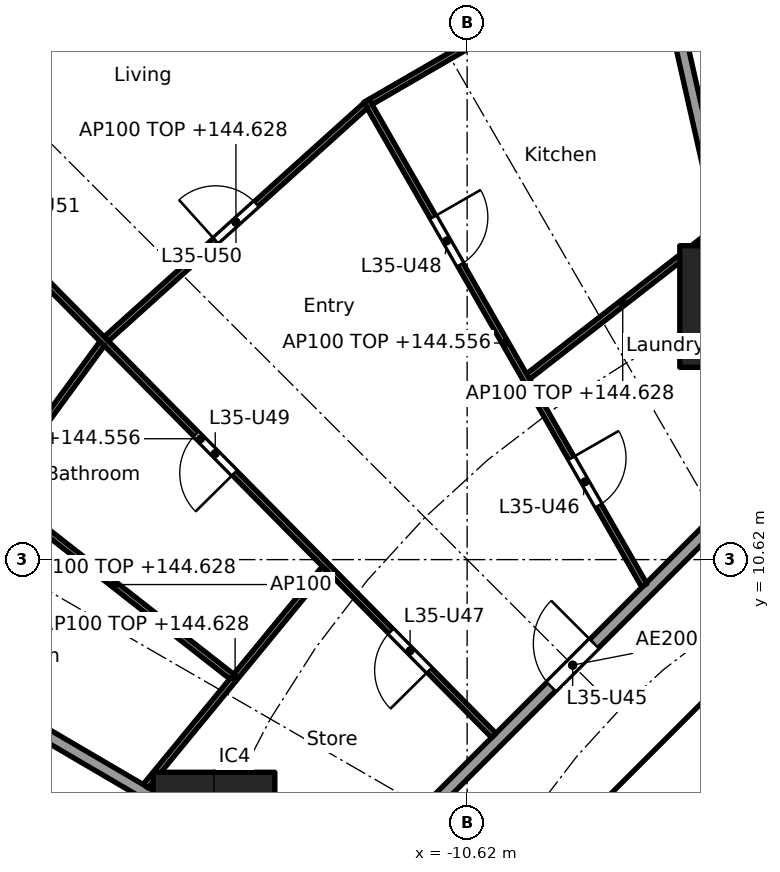
"""IFC4 building model, lengths in metres.
Left out: names, types, materials, properties, quantities, classifications, styles, units other than length and angle.
Written with IfcOpenShell. Run it as: python <this file> out.ifc"""

import sys

from ifc_helpers import new_model, si_unit, direction, frame, frame_2d, origin, origin_2d, place, context, subcontext, project, spatial, rectangle, extrude, element, fill, save


model = new_model("IFC4")
c1 = context("Model", 3, precision=1e-05, world=origin(), true_north=direction((0.0, 1.0)))
c2 = subcontext(c1, "Body", "Model", "MODEL_VIEW")
j1 = project(units=[si_unit("LENGTHUNIT", "METRE"), si_unit("PLANEANGLEUNIT", "RADIAN")], contexts=[c1])
p1 = place(None, origin())
s1 = spatial("IfcSite", under=j1, at=p1, CompositionType="ELEMENT")
p2 = place(p1, origin())
s2 = spatial("IfcBuilding", under=s1, at=p2, CompositionType="ELEMENT")
p3 = place(p2, frame((0.0, 0.0, 141.8)))
s3 = spatial("IfcBuildingStorey", under=s2, at=p3, CompositionType="ELEMENT", Elevation=141.8)
for number, where, z_axis, x_axis in (
    (1, (-6.123, 14.782, 0.0), (0.0, 0.0, 1.0), (1.0, 0.0, 0.0)),
    (2, (-14.782, 6.123, 0.0), (0.0, 0.0, 1.0), (1.0, 0.0, 0.0)),
):
    element("IfcColumn", number, at=place(p3, frame(where, z_axis=z_axis, x_axis=x_axis)), inside=s3, PredefinedType="COLUMN", context=c2, shape_type="SweptSolid", body=[
        extrude(rectangle(XDim=2.0, YDim=2.0, at=origin_2d()), origin(), (0.0, 0.0, 1.0), 3.7),
    ])
p4 = place(p3, frame((-4.613, 9.988, 0.0), z_axis=(0.0, 0.0, 1.0), x_axis=(-0.707106781187, -0.707106781187, 0.0)))
e3 = element("IfcWall", 3, at=p4, inside=s3, PredefinedType="SHEAR", context=c2, shape_type="SweptSolid", body=[
    extrude(rectangle(XDim=7.602, YDim=0.6, at=frame_2d((3.801, 0.0))), origin(), (0.0, 0.0, 1.0), 3.44),
])
p5 = place(p4, frame((0.351, 0.0, 0.0)))
e4 = element("IfcOpeningElement", 4, at=p5, cuts=e3, PredefinedType="OPENING", context=c2, shape_type="SweptSolid", body=[
    extrude(rectangle(XDim=1.1, YDim=2.1, at=frame_2d((0.55, 1.05))), frame((0.0, 0.31, 0.0), z_axis=(0.0, -1.0, 0.0), x_axis=(1.0, 0.0, 0.0)), (0.0, 0.0, 1.0), 0.62),
])
p6 = place(p3, frame((-6.134, 14.831, 0.0), z_axis=(0.0, 0.0, 1.0), x_axis=(-0.220337590808, 0.975423675167, 0.0)))
e5 = element("IfcWall", 5, at=p6, inside=s3, PredefinedType="PARTITIONING", context=c2, shape_type="SweptSolid", body=[
    extrude(rectangle(XDim=10.451, YDim=0.2, at=frame_2d((5.226, 0.0))), origin(), (0.0, 0.0, 1.0), 2.828),
])
p7 = place(p3, frame((-14.825, 6.148, 0.0), z_axis=(0.0, 0.0, 1.0), x_axis=(-0.862852031662, 0.505456597006, 0.0)))
e6 = element("IfcWall", 6, at=p7, inside=s3, PredefinedType="PARTITIONING", context=c2, shape_type="SweptSolid", body=[
    extrude(rectangle(XDim=10.487, YDim=0.2, at=frame_2d((5.244, 0.0))), origin(), (0.0, 0.0, 1.0), 2.828),
])
p8 = place(p3, frame((-5.275, 12.494, 0.0), z_axis=(0.0, 0.0, 1.0), x_axis=(-0.707106781187, -0.707106781187, 0.0)))
e7 = element("IfcWall", 7, at=p8, inside=s3, PredefinedType="PARTITIONING", context=c2, shape_type="SweptSolid", body=[
    extrude(rectangle(XDim=10.209, YDim=0.2, at=frame_2d((5.104, 0.0))), origin(), (0.0, 0.0, 1.0), 3.44),
])
p9 = place(p8, frame((4.604, 0.0, 0.0)))
e8 = element("IfcOpeningElement", 8, at=p9, cuts=e7, PredefinedType="OPENING", context=c2, shape_type="SweptSolid", body=[
    extrude(rectangle(XDim=1.0, YDim=2.1, at=frame_2d((0.5, 1.05))), frame((0.0, 0.11, 0.0), z_axis=(0.0, -1.0, 0.0), x_axis=(1.0, 0.0, 0.0)), (0.0, 0.0, 1.0), 0.22),
])
p10 = place(p3, frame((-6.503, 16.054, 0.0), z_axis=(0.0, 0.0, 1.0), x_axis=(-0.789428807693, -0.613842127574, 0.0)))
e9 = element("IfcWall", 9, at=p10, inside=s3, PredefinedType="PARTITIONING", context=c2, shape_type="SweptSolid", body=[
    extrude(rectangle(XDim=3.948, YDim=0.1, at=frame_2d((1.974, 0.0))), origin(), (0.0, 0.0, 1.0), 2.828),
])
p11 = place(p3, frame((-7.586, 20.827, 0.0), z_axis=(0.0, 0.0, 1.0), x_axis=(-0.865093450578, -0.501610727325, 0.0)))
e10 = element("IfcWall", 10, at=p11, inside=s3, PredefinedType="PARTITIONING", context=c2, shape_type="SweptSolid", body=[
    extrude(rectangle(XDim=5.343, YDim=0.1, at=frame_2d((2.671, 0.0))), origin(), (0.0, 0.0, 1.0), 2.828),
])
p12 = place(p3, frame((-7.708, 10.198, 0.0), z_axis=(0.0, 0.0, 1.0), x_axis=(-0.497449462689, 0.867492957937, 0.0)))
e11 = element("IfcWall", 11, at=p12, inside=s3, PredefinedType="PARTITIONING", context=c2, shape_type="SweptSolid", body=[
    extrude(rectangle(XDim=9.185, YDim=0.1, at=frame_2d((4.592, 0.0))), origin(), (0.0, 0.0, 1.0), 2.756),
])
p13 = place(p12, frame((1.511, 0.0, 0.0)))
e12 = element("IfcOpeningElement", 12, at=p13, cuts=e11, PredefinedType="OPENING", context=c2, shape_type="SweptSolid", body=[
    extrude(rectangle(XDim=0.9, YDim=2.1, at=frame_2d((0.45, 1.05))), frame((0.0, 0.06, 0.0), z_axis=(0.0, -1.0, 0.0), x_axis=(1.0, 0.0, 0.0)), (0.0, 0.0, 1.0), 0.12),
])
p14 = place(p12, frame((6.078, 0.0, 0.0)))
e13 = element("IfcOpeningElement", 13, at=p14, cuts=e11, PredefinedType="OPENING", context=c2, shape_type="SweptSolid", body=[
    extrude(rectangle(XDim=0.9, YDim=2.1, at=frame_2d((0.45, 1.05))), frame((0.0, 0.06, 0.0), z_axis=(0.0, -1.0, 0.0), x_axis=(1.0, 0.0, 0.0)), (0.0, 0.0, 1.0), 0.12),
])
p15 = place(p3, frame((-12.289, 18.089, 0.0), z_axis=(0.0, 0.0, 1.0), x_axis=(-0.743146066164, -0.669129228435, 0.0)))
e14 = element("IfcWall", 14, at=p15, inside=s3, PredefinedType="PARTITIONING", context=c2, shape_type="SweptSolid", body=[
    extrude(rectangle(XDim=5.739, YDim=0.1, at=frame_2d((2.87, 0.0))), origin(), (0.0, 0.0, 1.0), 2.828),
])
p16 = place(p15, frame((2.42, 0.0, 0.0)))
e15 = element("IfcOpeningElement", 15, at=p16, cuts=e14, PredefinedType="OPENING", context=c2, shape_type="SweptSolid", body=[
    extrude(rectangle(XDim=0.9, YDim=2.1, at=frame_2d((0.45, 1.05))), frame((0.0, 0.06, 0.0), z_axis=(0.0, -1.0, 0.0), x_axis=(1.0, 0.0, 0.0)), (0.0, 0.0, 1.0), 0.12),
])
p17 = place(p3, frame((-10.182, 7.729, 0.0), z_axis=(0.0, 0.0, 1.0), x_axis=(-0.702930219229, 0.7112588185, 0.0)))
e16 = element("IfcWall", 16, at=p17, inside=s3, PredefinedType="PARTITIONING", context=c2, shape_type="SweptSolid", body=[
    extrude(rectangle(XDim=13.719, YDim=0.1, at=frame_2d((6.859, 0.0))), origin(), (0.0, 0.0, 1.0), 2.756),
])
p18 = place(p17, frame((1.507, 0.0, 0.0)))
e17 = element("IfcOpeningElement", 17, at=p18, cuts=e16, PredefinedType="OPENING", context=c2, shape_type="SweptSolid", body=[
    extrude(rectangle(XDim=0.9, YDim=2.1, at=frame_2d((0.45, 1.05))), frame((0.0, 0.06, 0.0), z_axis=(0.0, -1.0, 0.0), x_axis=(1.0, 0.0, 0.0)), (0.0, 0.0, 1.0), 0.12),
])
p19 = place(p17, frame((6.067, 0.0, 0.0)))
e18 = element("IfcOpeningElement", 18, at=p19, cuts=e16, PredefinedType="OPENING", context=c2, shape_type="SweptSolid", body=[
    extrude(rectangle(XDim=0.9, YDim=2.1, at=frame_2d((0.45, 1.05))), frame((0.0, 0.06, 0.0), z_axis=(0.0, -1.0, 0.0), x_axis=(1.0, 0.0, 0.0)), (0.0, 0.0, 1.0), 0.12),
])
p20 = place(p17, frame((10.969, 0.0, 0.0)))
e19 = element("IfcOpeningElement", 19, at=p20, cuts=e16, PredefinedType="OPENING", context=c2, shape_type="SweptSolid", body=[
    extrude(rectangle(XDim=0.9, YDim=2.1, at=frame_2d((0.45, 1.05))), frame((0.0, 0.06, 0.0), z_axis=(0.0, -1.0, 0.0), x_axis=(1.0, 0.0, 0.0)), (0.0, 0.0, 1.0), 0.12),
])
p21 = place(p3, frame((-12.965, 10.475, 0.0), z_axis=(0.0, 0.0, 1.0), x_axis=(-0.634943961338, -0.772558195841, 0.0)))
e20 = element("IfcWall", 20, at=p21, inside=s3, PredefinedType="PARTITIONING", context=c2, shape_type="SweptSolid", body=[
    extrude(rectangle(XDim=4.632, YDim=0.1, at=frame_2d((2.316, 0.0))), origin(), (0.0, 0.0, 1.0), 2.828),
])
p22 = place(p3, frame((-16.621, 14.174, 0.0), z_axis=(0.0, 0.0, 1.0), x_axis=(-0.590674917338, -0.806909624449, 0.0)))
e21 = element("IfcWall", 21, at=p22, inside=s3, PredefinedType="PARTITIONING", context=c2, shape_type="SweptSolid", body=[
    extrude(rectangle(XDim=5.949, YDim=0.1, at=frame_2d((2.975, 0.0))), origin(), (0.0, 0.0, 1.0), 2.828),
])
p23 = place(p22, frame((4.024, 0.0, 0.0)))
e22 = element("IfcOpeningElement", 22, at=p23, cuts=e21, PredefinedType="OPENING", context=c2, shape_type="SweptSolid", body=[
    extrude(rectangle(XDim=0.9, YDim=2.1, at=frame_2d((0.45, 1.05))), frame((0.0, 0.06, 0.0), z_axis=(0.0, -1.0, 0.0), x_axis=(1.0, 0.0, 0.0)), (0.0, 0.0, 1.0), 0.12),
])
p24 = place(p3, frame((-14.491, 8.697, 0.0), z_axis=(0.0, 0.0, 1.0), x_axis=(-0.787139479951, 0.616775031193, 0.0)))
e23 = element("IfcWall", 23, at=p24, inside=s3, PredefinedType="PARTITIONING", context=c2, shape_type="SweptSolid", body=[
    extrude(rectangle(XDim=4.907, YDim=0.1, at=frame_2d((2.453, 0.0))), origin(), (0.0, 0.0, 1.0), 3.44),
])
p25 = place(p9, frame((1.0, 0.0, 0.0), x_axis=(-1.0, 0.0, 0.0)))
e24 = element("IfcDoor", 24, at=p25, inside=s3, OperationType="SINGLE_SWING_RIGHT", PredefinedType="DOOR", context=c2, shape_type="SweptSolid", body=[
    extrude(rectangle(XDim=1.0, YDim=2.1, at=frame_2d((0.5, 1.05))), frame((0.0, 0.025, 0.0), z_axis=(0.0, -1.0, 0.0), x_axis=(1.0, 0.0, 0.0)), (0.0, 0.0, 1.0), 0.05),
])
fill(e8, e24)
p26 = place(p13, frame((0.9, 0.0, 0.0), x_axis=(-1.0, 0.0, 0.0)))
e25 = element("IfcDoor", 25, at=p26, inside=s3, OperationType="SINGLE_SWING_LEFT", PredefinedType="DOOR", context=c2, shape_type="SweptSolid", body=[
    extrude(rectangle(XDim=0.9, YDim=2.1, at=frame_2d((0.45, 1.05))), frame((0.0, 0.025, 0.0), z_axis=(0.0, -1.0, 0.0), x_axis=(1.0, 0.0, 0.0)), (0.0, 0.0, 1.0), 0.05),
])
fill(e12, e25)
p27 = place(p18, origin())
e26 = element("IfcDoor", 26, at=p27, inside=s3, OperationType="SINGLE_SWING_LEFT", PredefinedType="DOOR", context=c2, shape_type="SweptSolid", body=[
    extrude(rectangle(XDim=0.9, YDim=2.1, at=frame_2d((0.45, 1.05))), frame((0.0, 0.025, 0.0), z_axis=(0.0, -1.0, 0.0), x_axis=(1.0, 0.0, 0.0)), (0.0, 0.0, 1.0), 0.05),
])
fill(e17, e26)
p28 = place(p14, frame((0.9, 0.0, 0.0), x_axis=(-1.0, 0.0, 0.0)))
e27 = element("IfcDoor", 27, at=p28, inside=s3, OperationType="SINGLE_SWING_LEFT", PredefinedType="DOOR", context=c2, shape_type="SweptSolid", body=[
    extrude(rectangle(XDim=0.9, YDim=2.1, at=frame_2d((0.45, 1.05))), frame((0.0, 0.025, 0.0), z_axis=(0.0, -1.0, 0.0), x_axis=(1.0, 0.0, 0.0)), (0.0, 0.0, 1.0), 0.05),
])
fill(e13, e27)
p29 = place(p19, origin())
e28 = element("IfcDoor", 28, at=p29, inside=s3, OperationType="SINGLE_SWING_LEFT", PredefinedType="DOOR", context=c2, shape_type="SweptSolid", body=[
    extrude(rectangle(XDim=0.9, YDim=2.1, at=frame_2d((0.45, 1.05))), frame((0.0, 0.025, 0.0), z_axis=(0.0, -1.0, 0.0), x_axis=(1.0, 0.0, 0.0)), (0.0, 0.0, 1.0), 0.05),
])
fill(e18, e28)
p30 = place(p16, frame((0.9, 0.0, 0.0), x_axis=(-1.0, 0.0, 0.0)))
e29 = element("IfcDoor", 29, at=p30, inside=s3, OperationType="SINGLE_SWING_LEFT", PredefinedType="DOOR", context=c2, shape_type="SweptSolid", body=[
    extrude(rectangle(XDim=0.9, YDim=2.1, at=frame_2d((0.45, 1.05))), frame((0.0, 0.025, 0.0), z_axis=(0.0, -1.0, 0.0), x_axis=(1.0, 0.0, 0.0)), (0.0, 0.0, 1.0), 0.05),
])
fill(e15, e29)
save(model, sys.argv[1])
